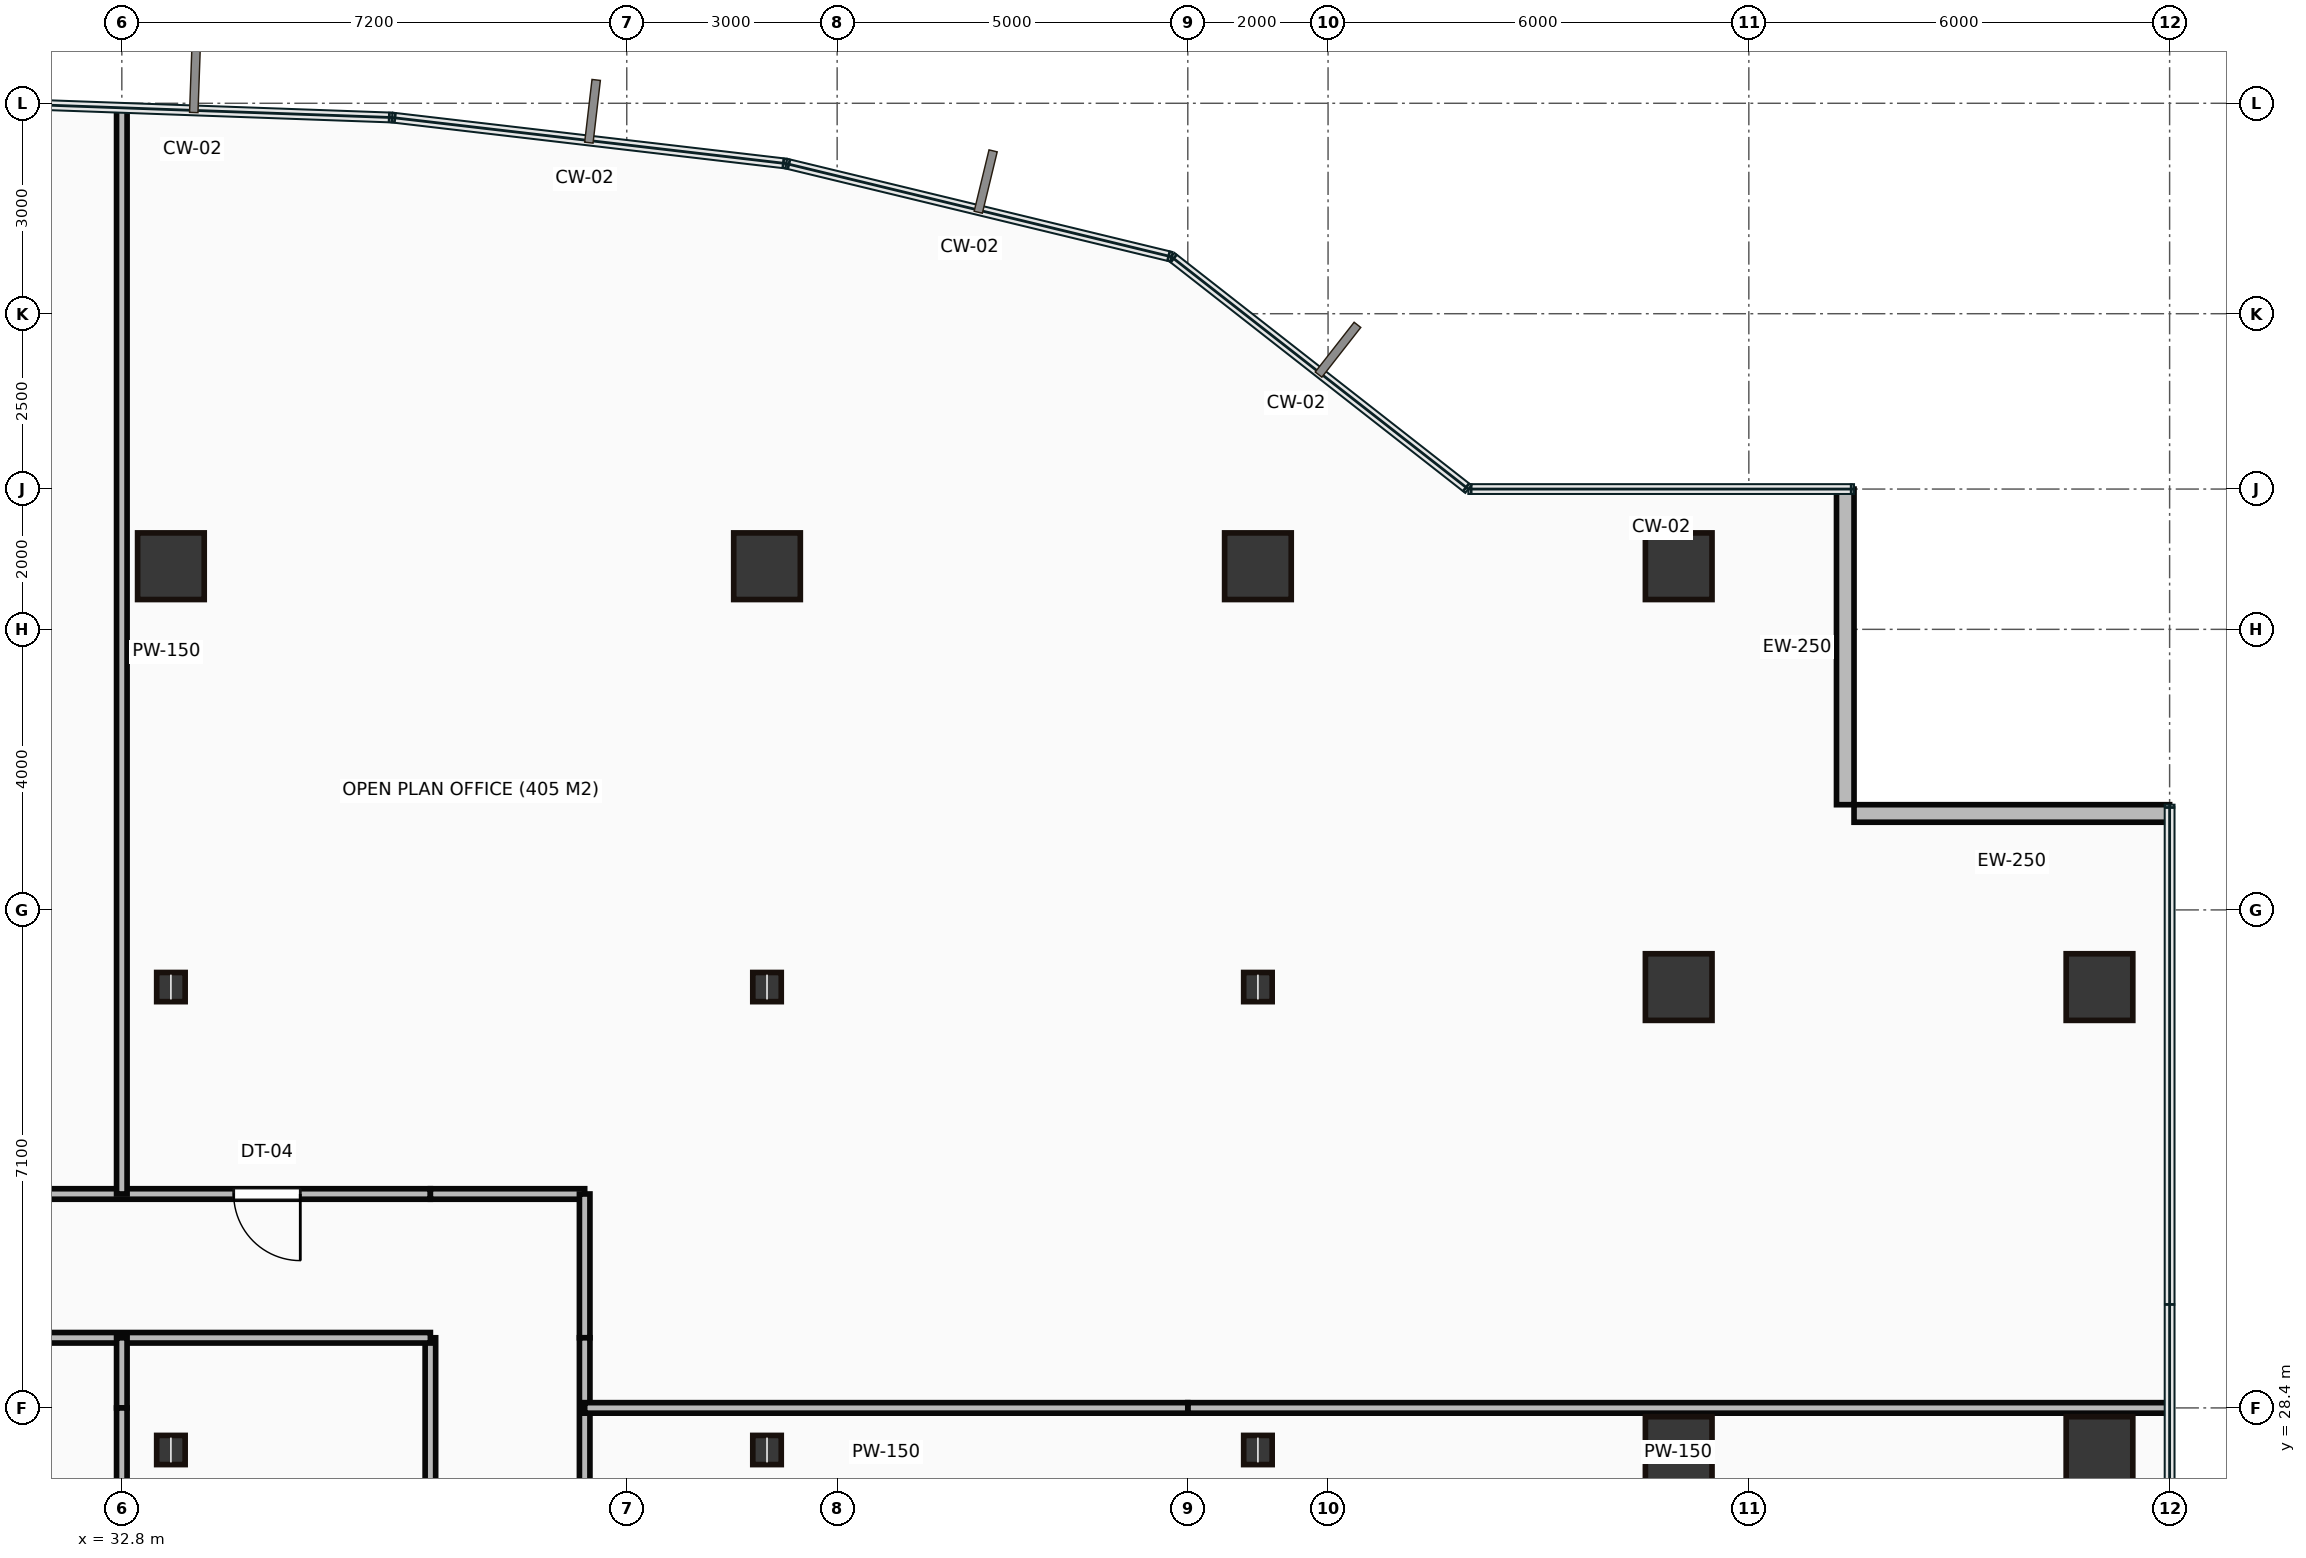
"""IFC4 building model, lengths in metres.
Left out: names, types, materials, properties, quantities, classifications, styles, units other than length and angle.
Written with IfcOpenShell. Run it as: python <this file> out.ifc"""

import sys

from ifc_helpers import new_model, si_unit, direction, frame, frame_2d, origin, origin_2d, place, context, subcontext, project, spatial, rectangle, hollow_rectangle, i_section, extrude, source, transform, mapped, element, fill, save


model = new_model("IFC4")
c1 = context("Model", 3, precision=1e-05, world=origin(), true_north=direction((0.0, 1.0)))
c2 = subcontext(c1, "Body", "Model", "MODEL_VIEW")
j1 = project(units=[si_unit("LENGTHUNIT", "METRE"), si_unit("PLANEANGLEUNIT", "RADIAN")], contexts=[c1])
p1 = place(None, origin())
s1 = spatial("IfcSite", under=j1, at=p1, CompositionType="ELEMENT")
p2 = place(p1, origin())
s2 = spatial("IfcBuilding", under=s1, at=p2, CompositionType="ELEMENT")
p3 = place(p2, frame((0.0, 0.0, 36.15)))
s3 = spatial("IfcBuildingStorey", under=s2, at=p3, CompositionType="ELEMENT", Elevation=36.15)
m1 = source(origin(), c2, "Body", "SweptSolid", [
    extrude(i_section(OverallWidth=0.406, OverallDepth=0.416, WebThickness=0.03, FlangeThickness=0.048, at=origin_2d()), origin(), (0.0, 0.0, 1.0), 3.65),
])
for number, where, z_axis, x_axis in (
    (1, (33.5, 27.8, 0.0), (0.0, 0.0, 1.0), (1.0, 0.0, 0.0)),
    (2, (33.5, 34.4, 0.0), (0.0, 0.0, 1.0), (1.0, 0.0, 0.0)),
):
    element("IfcColumn", number, at=place(p3, frame(where, z_axis=z_axis, x_axis=x_axis)), inside=s3, PredefinedType="COLUMN", context=c2, shape_type="MappedRepresentation", body=[
        mapped(m1, transform((0.0, 0.0, 0.0))),
    ])
m2 = source(origin(), c2, "Body", "SweptSolid", [
    extrude(hollow_rectangle(XDim=0.95, YDim=0.95, WallThickness=0.045, at=origin_2d()), origin(), (0.0, 0.0, 1.0), 3.65),
])
p4 = place(p3, frame((33.5, 40.4, 0.0), z_axis=(0.0, 0.0, 1.0), x_axis=(1.0, 0.0, 0.0)))
e3 = element("IfcColumn", 3, at=p4, inside=s3, PredefinedType="COLUMN", context=c2, shape_type="MappedRepresentation", body=[
    mapped(m2, transform((0.0, 0.0, 0.0))),
])
for number, where, z_axis, x_axis in (
    (4, (42.0, 27.8, 0.0), (0.0, 0.0, 1.0), (1.0, 0.0, 0.0)),
    (5, (42.0, 34.4, 0.0), (0.0, 0.0, 1.0), (1.0, 0.0, 0.0)),
):
    element("IfcColumn", number, at=place(p3, frame(where, z_axis=z_axis, x_axis=x_axis)), inside=s3, PredefinedType="COLUMN", context=c2, shape_type="MappedRepresentation", body=[
        mapped(m1, transform((0.0, 0.0, 0.0))),
    ])
p5 = place(p3, frame((42.0, 40.4, 0.0), z_axis=(0.0, 0.0, 1.0), x_axis=(1.0, 0.0, 0.0)))
e6 = element("IfcColumn", 6, at=p5, inside=s3, PredefinedType="COLUMN", context=c2, shape_type="MappedRepresentation", body=[
    mapped(m2, transform((0.0, 0.0, 0.0))),
])
for number, where, z_axis, x_axis in (
    (7, (49.0, 27.8, 0.0), (0.0, 0.0, 1.0), (1.0, 0.0, 0.0)),
    (8, (49.0, 34.4, 0.0), (0.0, 0.0, 1.0), (1.0, 0.0, 0.0)),
):
    element("IfcColumn", number, at=place(p3, frame(where, z_axis=z_axis, x_axis=x_axis)), inside=s3, PredefinedType="COLUMN", context=c2, shape_type="MappedRepresentation", body=[
        mapped(m1, transform((0.0, 0.0, 0.0))),
    ])
for number, where, z_axis, x_axis in (
    (9, (49.0, 40.4, 0.0), (0.0, 0.0, 1.0), (1.0, 0.0, 0.0)),
    (10, (55.0, 27.8, 0.0), (0.0, 0.0, 1.0), (1.0, 0.0, 0.0)),
    (11, (55.0, 34.4, 0.0), (0.0, 0.0, 1.0), (1.0, 0.0, 0.0)),
    (12, (55.0, 40.4, 0.0), (0.0, 0.0, 1.0), (1.0, 0.0, 0.0)),
    (13, (61.0, 27.8, 0.0), (0.0, 0.0, 1.0), (1.0, 0.0, 0.0)),
    (14, (61.0, 34.4, 0.0), (0.0, 0.0, 1.0), (1.0, 0.0, 0.0)),
):
    element("IfcColumn", number, at=place(p3, frame(where, z_axis=z_axis, x_axis=x_axis)), inside=s3, PredefinedType="COLUMN", context=c2, shape_type="MappedRepresentation", body=[
        mapped(m2, transform((0.0, 0.0, 0.0))),
    ])
m3 = source(origin(), c2, "Body", "SweptSolid", [
    extrude(rectangle(XDim=4.5, YDim=0.25, at=frame_2d((2.25, 0.0))), origin(), (0.0, 0.0, 1.0), 3.4),
])
for number, where, z_axis, x_axis in (
    (15, (62.0, 36.875, 0.0), (0.0, 0.0, 1.0), (-1.0, 0.0, 0.0)),
    (16, (57.375, 37.0, 0.0), (0.0, 0.0, 1.0), (0.0, 1.0, 0.0)),
):
    element("IfcWall", number, at=place(p3, frame(where, z_axis=z_axis, x_axis=x_axis)), inside=s3, PredefinedType="STANDARD", context=c2, shape_type="MappedRepresentation", body=[
        mapped(m3, transform((0.0, 0.0, 0.0))),
    ])
m4 = source(origin(), c2, "Body", "SweptSolid", [
    extrude(rectangle(XDim=25.2, YDim=0.15, at=frame_2d((12.6, 0.0))), origin(), (0.0, 0.0, 1.0), 3.4),
])
p6 = place(p3, frame((12.0, 31.45, 0.0), z_axis=(0.0, 0.0, 1.0), x_axis=(1.0, 0.0, 0.0)))
e17 = element("IfcWall", 17, at=p6, inside=s3, PredefinedType="PARTITIONING", context=c2, shape_type="MappedRepresentation", body=[
    mapped(m4, transform((0.0, 0.0, 0.0))),
])
p7 = place(p6, frame((4.655, 0.0, 0.0)))
e18 = element("IfcOpeningElement", 18, at=p7, cuts=e17, PredefinedType="OPENING", context=c2, shape_type="SweptSolid", body=[
    extrude(rectangle(XDim=0.95, YDim=2.15, at=frame_2d((0.475, 1.075))), frame((0.0, 0.085, 0.0), z_axis=(0.0, -1.0, 0.0), x_axis=(1.0, 0.0, 0.0)), (0.0, 0.0, 1.0), 0.17),
])
p8 = place(p6, frame((14.925, 0.0, 0.0)))
e19 = element("IfcOpeningElement", 19, at=p8, cuts=e17, PredefinedType="OPENING", context=c2, shape_type="SweptSolid", body=[
    extrude(rectangle(XDim=0.95, YDim=2.15, at=frame_2d((0.475, 1.075))), frame((0.0, 0.085, 0.0), z_axis=(0.0, -1.0, 0.0), x_axis=(1.0, 0.0, 0.0)), (0.0, 0.0, 1.0), 0.17),
])
p9 = place(p6, frame((22.395, 0.0, 0.0)))
e20 = element("IfcOpeningElement", 20, at=p9, cuts=e17, PredefinedType="OPENING", context=c2, shape_type="SweptSolid", body=[
    extrude(rectangle(XDim=0.95, YDim=2.15, at=frame_2d((0.475, 1.075))), frame((0.0, 0.085, 0.0), z_axis=(0.0, -1.0, 0.0), x_axis=(1.0, 0.0, 0.0)), (0.0, 0.0, 1.0), 0.17),
])
m5 = source(origin(), c2, "Body", "SweptSolid", [
    extrude(rectangle(XDim=2.2, YDim=0.15, at=frame_2d((1.1, 0.0))), origin(), (0.0, 0.0, 1.0), 3.4),
])
p10 = place(p3, frame((37.2, 31.45, 0.0), z_axis=(0.0, 0.0, 1.0), x_axis=(1.0, 0.0, 0.0)))
e21 = element("IfcWall", 21, at=p10, inside=s3, PredefinedType="PARTITIONING", context=c2, shape_type="MappedRepresentation", body=[
    mapped(m5, transform((0.0, 0.0, 0.0))),
])
m6 = source(origin(), c2, "Body", "SweptSolid", [
    extrude(rectangle(XDim=2.05, YDim=0.15, at=frame_2d((1.025, 0.0))), origin(), (0.0, 0.0, 1.0), 3.4),
])
p11 = place(p3, frame((39.4, 31.45, 0.0), z_axis=(0.0, 0.0, 1.0), x_axis=(0.0, -1.0, 0.0)))
e22 = element("IfcWall", 22, at=p11, inside=s3, PredefinedType="PARTITIONING", context=c2, shape_type="MappedRepresentation", body=[
    mapped(m6, transform((0.0, 0.0, 0.0))),
])
m7 = source(origin(), c2, "Body", "SweptSolid", [
    extrude(rectangle(XDim=13.15, YDim=0.15, at=frame_2d((6.575, 0.0))), origin(), (0.0, 0.0, 1.0), 3.4),
])
p12 = place(p3, frame((39.4, 29.4, 0.0), z_axis=(0.0, 0.0, 1.0), x_axis=(0.0, -1.0, 0.0)))
e23 = element("IfcWall", 23, at=p12, inside=s3, PredefinedType="PARTITIONING", context=c2, shape_type="MappedRepresentation", body=[
    mapped(m7, transform((0.0, 0.0, 0.0))),
])
p13 = place(p12, frame((6.47, 0.0, 0.0)))
e24 = element("IfcOpeningElement", 24, at=p13, cuts=e23, PredefinedType="OPENING", context=c2, shape_type="SweptSolid", body=[
    extrude(rectangle(XDim=0.95, YDim=2.15, at=frame_2d((0.475, 1.075))), frame((0.0, 0.085, 0.0), z_axis=(0.0, -1.0, 0.0), x_axis=(1.0, 0.0, 0.0)), (0.0, 0.0, 1.0), 0.17),
])
p14 = place(p3, frame((37.2, 16.25, 0.0), z_axis=(0.0, 0.0, 1.0), x_axis=(0.0, 1.0, 0.0)))
e25 = element("IfcWall", 25, at=p14, inside=s3, PredefinedType="PARTITIONING", context=c2, shape_type="MappedRepresentation", body=[
    mapped(m7, transform((0.0, 0.0, 0.0))),
])
p15 = place(p14, frame((6.1, 0.0, 0.0)))
e26 = element("IfcOpeningElement", 26, at=p15, cuts=e25, PredefinedType="OPENING", context=c2, shape_type="SweptSolid", body=[
    extrude(rectangle(XDim=0.95, YDim=2.15, at=frame_2d((0.475, 1.075))), frame((0.0, 0.085, 0.0), z_axis=(0.0, -1.0, 0.0), x_axis=(1.0, 0.0, 0.0)), (0.0, 0.0, 1.0), 0.17),
])
p16 = place(p3, frame((37.2, 29.4, 0.0), z_axis=(0.0, 0.0, 1.0), x_axis=(-1.0, 0.0, 0.0)))
e27 = element("IfcWall", 27, at=p16, inside=s3, PredefinedType="PARTITIONING", context=c2, shape_type="MappedRepresentation", body=[
    mapped(m4, transform((0.0, 0.0, 0.0))),
])
m8 = source(origin(), c2, "Body", "SweptSolid", [
    extrude(rectangle(XDim=1.0, YDim=0.15, at=frame_2d((0.5, 0.0))), origin(), (0.0, 0.0, 1.0), 3.4),
])
p17 = place(p3, frame((32.8, 29.4, 0.0), z_axis=(0.0, 0.0, 1.0), x_axis=(0.0, -1.0, 0.0)))
e28 = element("IfcWall", 28, at=p17, inside=s3, PredefinedType="PARTITIONING", context=c2, shape_type="MappedRepresentation", body=[
    mapped(m8, transform((0.0, 0.0, 0.0))),
])
m9 = source(origin(), c2, "Body", "SweptSolid", [
    extrude(rectangle(XDim=12.15, YDim=0.15, at=frame_2d((6.075, 0.0))), origin(), (0.0, 0.0, 1.0), 3.4),
])
p18 = place(p3, frame((32.8, 28.4, 0.0), z_axis=(0.0, 0.0, 1.0), x_axis=(0.0, -1.0, 0.0)))
e29 = element("IfcWall", 29, at=p18, inside=s3, PredefinedType="PARTITIONING", context=c2, shape_type="MappedRepresentation", body=[
    mapped(m9, transform((0.0, 0.0, 0.0))),
])
m10 = source(origin(), c2, "Body", "SweptSolid", [
    extrude(rectangle(XDim=15.465, YDim=0.15, at=frame_2d((7.733, 0.0))), origin(), (0.0, 0.0, 1.0), 3.4),
])
p19 = place(p3, frame((32.8, 46.915, 0.0), z_axis=(0.0, 0.0, 1.0), x_axis=(0.0, -1.0, 0.0)))
e30 = element("IfcWall", 30, at=p19, inside=s3, PredefinedType="PARTITIONING", context=c2, shape_type="MappedRepresentation", body=[
    mapped(m10, transform((0.0, 0.0, 0.0))),
])
m11 = source(origin(), c2, "Body", "SweptSolid", [
    extrude(rectangle(XDim=13.98, YDim=0.15, at=frame_2d((6.99, 0.0))), origin(), (0.0, 0.0, 1.0), 3.4),
])
p20 = place(p3, frame((61.98, 28.4, 0.0), z_axis=(0.0, 0.0, 1.0), x_axis=(-1.0, 0.0, 0.0)))
e31 = element("IfcWall", 31, at=p20, inside=s3, PredefinedType="PARTITIONING", context=c2, shape_type="MappedRepresentation", body=[
    mapped(m11, transform((0.0, 0.0, 0.0))),
])
m12 = source(origin(), c2, "Body", "SweptSolid", [
    extrude(rectangle(XDim=8.6, YDim=0.15, at=frame_2d((4.3, 0.0))), origin(), (0.0, 0.0, 1.0), 3.4),
])
p21 = place(p3, frame((48.0, 28.4, 0.0), z_axis=(0.0, 0.0, 1.0), x_axis=(-1.0, 0.0, 0.0)))
e32 = element("IfcWall", 32, at=p21, inside=s3, PredefinedType="PARTITIONING", context=c2, shape_type="MappedRepresentation", body=[
    mapped(m12, transform((0.0, 0.0, 0.0))),
])
m13 = source(origin(), c2, "Body", "SweptSolid", [
    extrude(rectangle(XDim=0.95, YDim=2.15, at=frame_2d((0.475, 1.075))), frame((0.0, 0.025, 0.0), z_axis=(0.0, -1.0, 0.0), x_axis=(1.0, 0.0, 0.0)), (0.0, 0.0, 1.0), 0.05),
])
p22 = place(p9, origin())
e33 = element("IfcDoor", 33, at=p22, inside=s3, OperationType="SINGLE_SWING_RIGHT", PredefinedType="DOOR", context=c2, shape_type="MappedRepresentation", body=[
    mapped(m13, transform((0.0, 0.0, 0.0))),
])
fill(e20, e33)
save(model, sys.argv[1])
